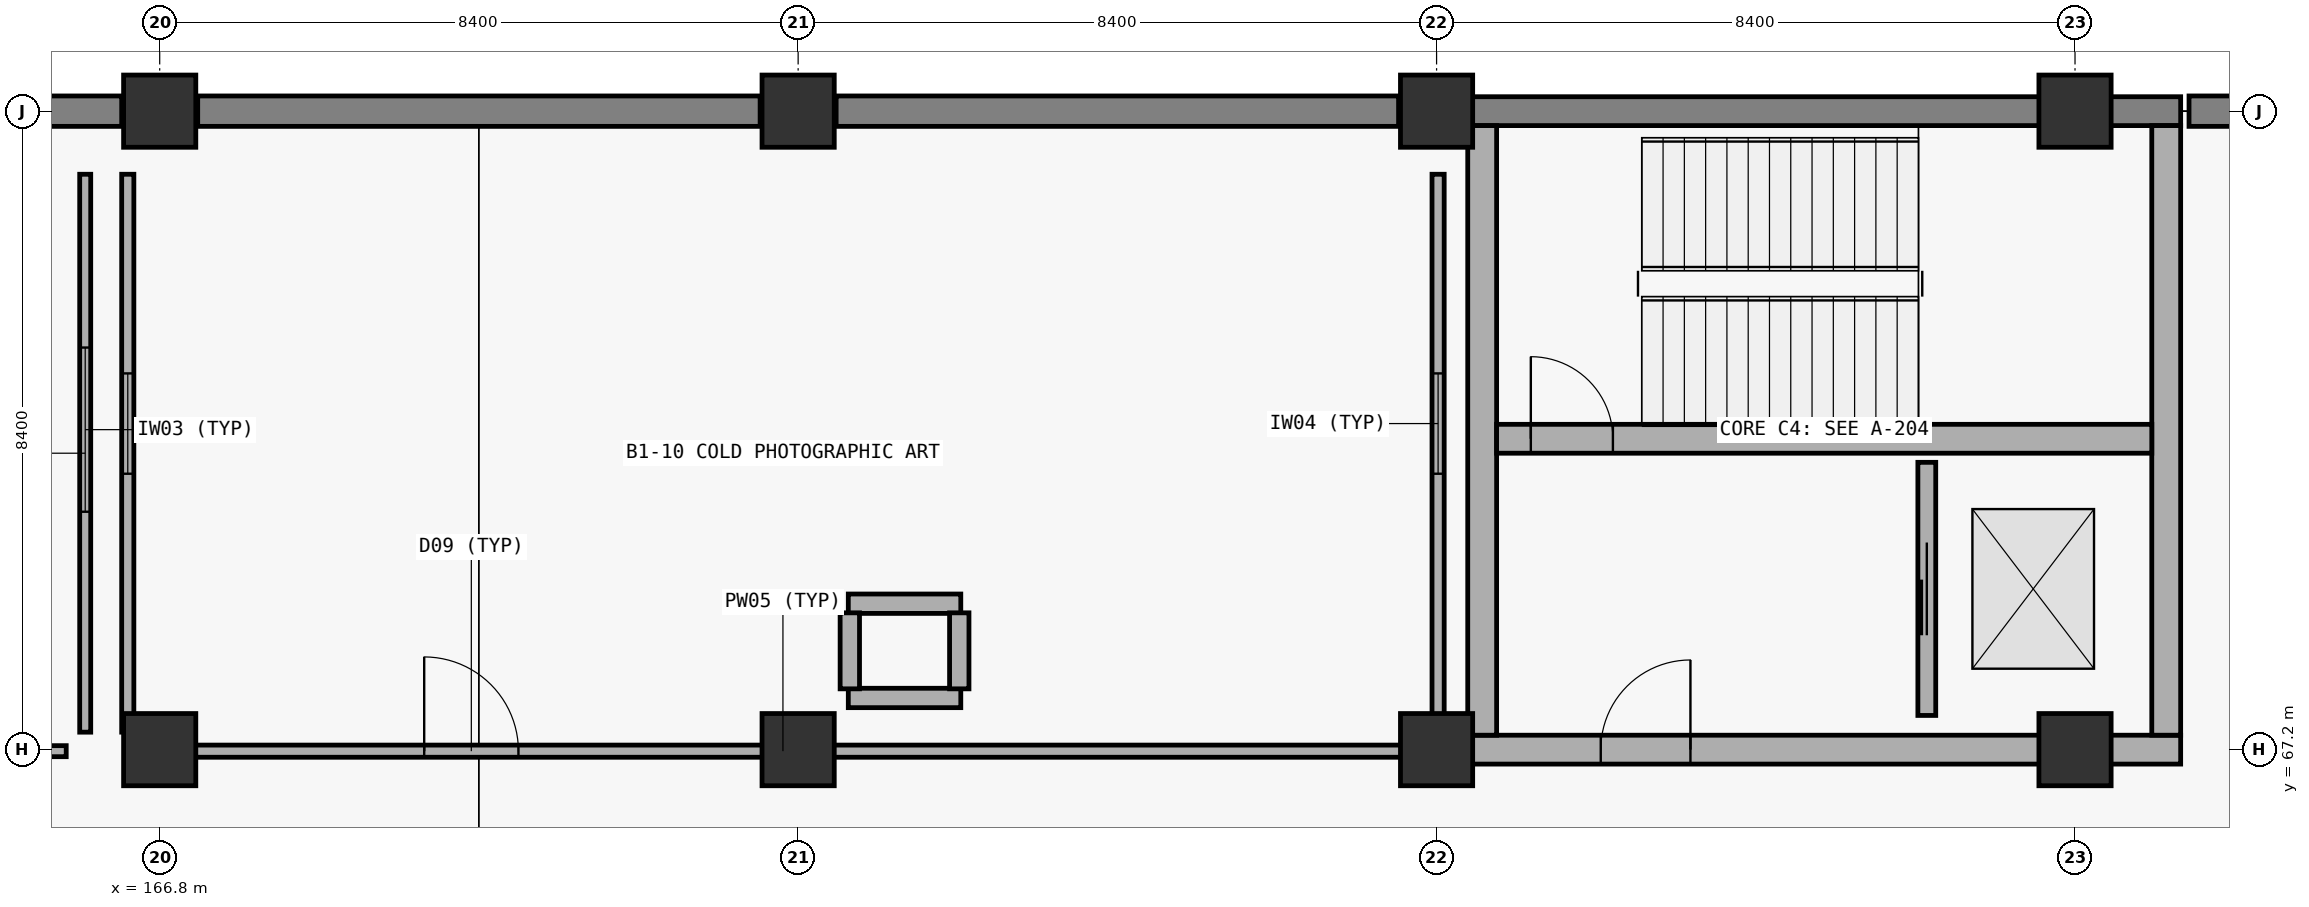
"""IFC4 building model, lengths in metres.
Left out: names, types, materials, properties, quantities, classifications, styles, units other than length and angle.
Written with IfcOpenShell. Run it as: python <this file> out.ifc"""

import sys

from ifc_helpers import new_model, si_unit, direction, frame, frame_2d, origin, origin_2d, place, context, subcontext, project, spatial, rectangle, extrude, element, fill, save


model = new_model("IFC4")
c1 = context("Model", 3, precision=1e-05, world=origin(), true_north=direction((0.0, 1.0)))
c2 = subcontext(c1, "Body", "Model", "MODEL_VIEW")
j1 = project(units=[si_unit("LENGTHUNIT", "METRE"), si_unit("PLANEANGLEUNIT", "RADIAN")], contexts=[c1])
p1 = place(None, origin())
s1 = spatial("IfcSite", under=j1, at=p1, CompositionType="ELEMENT")
p2 = place(p1, origin())
s2 = spatial("IfcBuilding", under=s1, at=p2, CompositionType="ELEMENT")
p3 = place(p2, frame((0.0, 0.0, -4.8)))
s3 = spatial("IfcBuildingStorey", under=s2, at=p3, CompositionType="ELEMENT", Elevation=-4.8)
for number, where, z_axis, x_axis in (
    (1, (166.8, 67.2, 0.0), (0.0, 0.0, 1.0), (1.0, 0.0, 0.0)),
    (2, (166.8, 75.6, 0.0), (0.0, 0.0, 1.0), (1.0, 0.0, 0.0)),
    (3, (175.2, 67.2, 0.0), (0.0, 0.0, 1.0), (1.0, 0.0, 0.0)),
    (4, (175.2, 75.6, 0.0), (0.0, 0.0, 1.0), (1.0, 0.0, 0.0)),
    (5, (183.6, 67.2, 0.0), (0.0, 0.0, 1.0), (1.0, 0.0, 0.0)),
    (6, (183.6, 75.6, 0.0), (0.0, 0.0, 1.0), (1.0, 0.0, 0.0)),
    (7, (192.0, 67.2, 0.0), (0.0, 0.0, 1.0), (1.0, 0.0, 0.0)),
    (8, (192.0, 75.6, 0.0), (0.0, 0.0, 1.0), (1.0, 0.0, 0.0)),
):
    element("IfcColumn", number, at=place(p3, frame(where, z_axis=z_axis, x_axis=x_axis)), inside=s3, PredefinedType="COLUMN", context=c2, shape_type="SweptSolid", body=[
        extrude(rectangle(XDim=0.95, YDim=0.95, at=origin_2d()), origin(), (0.0, 0.0, 1.0), 4.8),
    ])
p4 = place(p3, frame((184.01, 67.2, 0.0), z_axis=(0.0, 0.0, 1.0), x_axis=(1.0, 0.0, 0.0)))
e9 = element("IfcWall", 9, at=p4, inside=s3, PredefinedType="SHEAR", context=c2, shape_type="SweptSolid", body=[
    extrude(rectangle(XDim=9.38, YDim=0.38, at=frame_2d((4.69, 0.0))), origin(), (0.0, 0.0, 1.0), 4.8),
])
p5 = place(p4, frame((1.75, 0.0, 0.0)))
e10 = element("IfcOpeningElement", 10, at=p5, cuts=e9, PredefinedType="OPENING", context=c2, shape_type="SweptSolid", body=[
    extrude(rectangle(XDim=1.18, YDim=2.24, at=frame_2d((0.59, 1.12))), frame((0.0, 0.2, 0.0), z_axis=(0.0, -1.0, 0.0), x_axis=(1.0, 0.0, 0.0)), (0.0, 0.0, 1.0), 0.4),
])
p6 = place(p3, frame((184.01, 75.6, 0.0), z_axis=(0.0, 0.0, 1.0), x_axis=(1.0, 0.0, 0.0)))
e11 = element("IfcWall", 11, at=p6, inside=s3, PredefinedType="SHEAR", context=c2, shape_type="SweptSolid", body=[
    extrude(rectangle(XDim=9.38, YDim=0.38, at=frame_2d((4.69, 0.0))), origin(), (0.0, 0.0, 1.0), 4.8),
])
for number, where, z_axis, x_axis in (
    (12, (184.2, 67.39, 0.0), (0.0, 0.0, 1.0), (0.0, 1.0, 0.0)),
    (13, (193.2, 67.39, 0.0), (0.0, 0.0, 1.0), (0.0, 1.0, 0.0)),
):
    element("IfcWall", number, at=place(p3, frame(where, z_axis=z_axis, x_axis=x_axis)), inside=s3, PredefinedType="SHEAR", context=c2, shape_type="SweptSolid", body=[
        extrude(rectangle(XDim=8.02, YDim=0.38, at=frame_2d((4.01, 0.0))), origin(), (0.0, 0.0, 1.0), 4.8),
    ])
p7 = place(p3, frame((184.39, 71.29, 0.0), z_axis=(0.0, 0.0, 1.0), x_axis=(1.0, 0.0, 0.0)))
e14 = element("IfcWall", 14, at=p7, inside=s3, PredefinedType="SHEAR", context=c2, shape_type="SweptSolid", body=[
    extrude(rectangle(XDim=8.62, YDim=0.38, at=frame_2d((4.31, 0.0))), origin(), (0.0, 0.0, 1.0), 4.8),
])
p8 = place(p7, frame((0.45, 0.0, 0.0)))
e15 = element("IfcOpeningElement", 15, at=p8, cuts=e14, PredefinedType="OPENING", context=c2, shape_type="SweptSolid", body=[
    extrude(rectangle(XDim=1.08, YDim=2.18, at=frame_2d((0.54, 1.09))), frame((0.0, 0.2, 0.0), z_axis=(0.0, -1.0, 0.0), x_axis=(1.0, 0.0, 0.0)), (0.0, 0.0, 1.0), 0.4),
])
p9 = place(p3, frame((158.9, 75.6, 0.0), z_axis=(0.0, 0.0, 1.0), x_axis=(1.0, 0.0, 0.0)))
e16 = element("IfcWall", 16, at=p9, inside=s3, PredefinedType="USERDEFINED", context=c2, shape_type="SweptSolid", body=[
    extrude(rectangle(XDim=7.4, YDim=0.4, at=frame_2d((3.7, 0.0))), origin(), (0.0, 0.0, 1.0), 4.8),
])
p10 = place(p3, frame((167.3, 75.6, 0.0), z_axis=(0.0, 0.0, 1.0), x_axis=(1.0, 0.0, 0.0)))
e17 = element("IfcWall", 17, at=p10, inside=s3, PredefinedType="USERDEFINED", context=c2, shape_type="SweptSolid", body=[
    extrude(rectangle(XDim=7.4, YDim=0.4, at=frame_2d((3.7, 0.0))), origin(), (0.0, 0.0, 1.0), 4.8),
])
p11 = place(p3, frame((175.7, 75.6, 0.0), z_axis=(0.0, 0.0, 1.0), x_axis=(1.0, 0.0, 0.0)))
e18 = element("IfcWall", 18, at=p11, inside=s3, PredefinedType="USERDEFINED", context=c2, shape_type="SweptSolid", body=[
    extrude(rectangle(XDim=7.4, YDim=0.4, at=frame_2d((3.7, 0.0))), origin(), (0.0, 0.0, 1.0), 4.8),
])
p12 = place(p3, frame((193.5, 75.6, 0.0), z_axis=(0.0, 0.0, 1.0), x_axis=(1.0, 0.0, 0.0)))
e19 = element("IfcWall", 19, at=p12, inside=s3, PredefinedType="USERDEFINED", context=c2, shape_type="SweptSolid", body=[
    extrude(rectangle(XDim=6.4, YDim=0.4, at=frame_2d((3.2, 0.0))), origin(), (0.0, 0.0, 1.0), 4.8),
])
p13 = place(p3, frame((190.05, 67.65, 0.0), z_axis=(0.0, 0.0, 1.0), x_axis=(0.0, 1.0, 0.0)))
e20 = element("IfcWall", 20, at=p13, inside=s3, PredefinedType="PARTITIONING", context=c2, shape_type="SweptSolid", body=[
    extrude(rectangle(XDim=3.33, YDim=0.235, at=frame_2d((1.665, 0.0))), origin(), (0.0, 0.0, 1.0), 3.46),
])
p14 = place(p13, frame((1.055, 0.0, 0.0)))
e21 = element("IfcOpeningElement", 21, at=p14, cuts=e20, PredefinedType="OPENING", context=c2, shape_type="SweptSolid", body=[
    extrude(rectangle(XDim=1.22, YDim=2.24, at=frame_2d((0.61, 1.12))), frame((0.0, 0.127, 0.0), z_axis=(0.0, -1.0, 0.0), x_axis=(1.0, 0.0, 0.0)), (0.0, 0.0, 1.0), 0.255),
])
for number, where, z_axis, x_axis in (
    (22, (175.86, 69.12, 0.0), (0.0, 0.0, 1.0), (1.0, 0.0, 0.0)),
    (23, (175.86, 67.88, 0.0), (0.0, 0.0, 1.0), (1.0, 0.0, 0.0)),
):
    element("IfcWall", number, at=place(p3, frame(where, z_axis=z_axis, x_axis=x_axis)), inside=s3, PredefinedType="PARTITIONING", context=c2, shape_type="SweptSolid", body=[
        extrude(rectangle(XDim=1.48, YDim=0.255, at=frame_2d((0.74, 0.0))), origin(), (0.0, 0.0, 1.0), 4.36),
    ])
for number, where, z_axis, x_axis in (
    (24, (175.88, 68.0, 0.0), (0.0, 0.0, 1.0), (0.0, 1.0, 0.0)),
    (25, (177.32, 68.0, 0.0), (0.0, 0.0, 1.0), (0.0, 1.0, 0.0)),
):
    element("IfcWall", number, at=place(p3, frame(where, z_axis=z_axis, x_axis=x_axis)), inside=s3, PredefinedType="PARTITIONING", context=c2, shape_type="SweptSolid", body=[
        extrude(rectangle(XDim=1.0, YDim=0.255, at=frame_2d((0.5, 0.0))), origin(), (0.0, 0.0, 1.0), 4.36),
    ])
p15 = place(p3, frame((142.43, 67.18, 0.0), z_axis=(0.0, 0.0, 1.0), x_axis=(1.0, 0.0, 0.0)))
e26 = element("IfcWall", 26, at=p15, inside=s3, PredefinedType="PARTITIONING", context=c2, shape_type="SweptSolid", body=[
    extrude(rectangle(XDim=23.14, YDim=0.145, at=frame_2d((11.57, 0.0))), origin(), (0.0, 0.0, 1.0), 3.41),
])
p16 = place(p15, frame((18.9, 0.0, 0.0)))
e27 = element("IfcOpeningElement", 27, at=p16, cuts=e26, PredefinedType="OPENING", context=c2, shape_type="SweptSolid", body=[
    extrude(rectangle(XDim=2.58, YDim=2.82, at=frame_2d((1.29, 1.41))), frame((0.0, 0.083, 0.0), z_axis=(0.0, -1.0, 0.0), x_axis=(1.0, 0.0, 0.0)), (0.0, 0.0, 1.0), 0.165),
])
p17 = place(p3, frame((165.82, 67.43, 0.0), z_axis=(0.0, 0.0, 1.0), x_axis=(0.0, 1.0, 0.0)))
e28 = element("IfcWall", 28, at=p17, inside=s3, PredefinedType="PARTITIONING", context=c2, shape_type="SweptSolid", body=[
    extrude(rectangle(XDim=7.34, YDim=0.145, at=frame_2d((3.67, 0.0))), origin(), (0.0, 0.0, 1.0), 3.41),
])
p18 = place(p17, frame((2.9, 0.0, 0.9)))
e29 = element("IfcOpeningElement", 29, at=p18, cuts=e28, PredefinedType="OPENING", context=c2, shape_type="SweptSolid", body=[
    extrude(rectangle(XDim=2.16, YDim=1.42, at=frame_2d((1.08, 0.71))), frame((0.0, 0.083, 0.0), z_axis=(0.0, -1.0, 0.0), x_axis=(1.0, 0.0, 0.0)), (0.0, 0.0, 1.0), 0.165),
])
p19 = place(p3, frame((166.63, 67.18, 0.0), z_axis=(0.0, 0.0, 1.0), x_axis=(1.0, 0.0, 0.0)))
e30 = element("IfcWall", 30, at=p19, inside=s3, PredefinedType="PARTITIONING", context=c2, shape_type="SweptSolid", body=[
    extrude(rectangle(XDim=16.74, YDim=0.16, at=frame_2d((8.37, 0.0))), origin(), (0.0, 0.0, 1.0), 2.96),
])
p20 = place(p19, frame((3.65, 0.0, 0.0)))
e31 = element("IfcOpeningElement", 31, at=p20, cuts=e30, PredefinedType="OPENING", context=c2, shape_type="SweptSolid", body=[
    extrude(rectangle(XDim=1.24, YDim=2.28, at=frame_2d((0.62, 1.14))), frame((0.0, 0.09, 0.0), z_axis=(0.0, -1.0, 0.0), x_axis=(1.0, 0.0, 0.0)), (0.0, 0.0, 1.0), 0.18),
])
p21 = place(p3, frame((166.38, 67.43, 0.0), z_axis=(0.0, 0.0, 1.0), x_axis=(0.0, 1.0, 0.0)))
e32 = element("IfcWall", 32, at=p21, inside=s3, PredefinedType="PARTITIONING", context=c2, shape_type="SweptSolid", body=[
    extrude(rectangle(XDim=7.34, YDim=0.16, at=frame_2d((3.67, 0.0))), origin(), (0.0, 0.0, 1.0), 3.41),
])
p22 = place(p21, frame((3.4, 0.0, 0.9)))
e33 = element("IfcOpeningElement", 33, at=p22, cuts=e32, PredefinedType="OPENING", context=c2, shape_type="SweptSolid", body=[
    extrude(rectangle(XDim=1.32, YDim=1.5, at=frame_2d((0.66, 0.75))), frame((0.0, 0.09, 0.0), z_axis=(0.0, -1.0, 0.0), x_axis=(1.0, 0.0, 0.0)), (0.0, 0.0, 1.0), 0.18),
])
p23 = place(p3, frame((183.62, 67.43, 0.0), z_axis=(0.0, 0.0, 1.0), x_axis=(0.0, 1.0, 0.0)))
e34 = element("IfcWall", 34, at=p23, inside=s3, PredefinedType="PARTITIONING", context=c2, shape_type="SweptSolid", body=[
    extrude(rectangle(XDim=7.34, YDim=0.16, at=frame_2d((3.67, 0.0))), origin(), (0.0, 0.0, 1.0), 3.46),
])
p24 = place(p23, frame((3.4, 0.0, 0.9)))
e35 = element("IfcOpeningElement", 35, at=p24, cuts=e34, PredefinedType="OPENING", context=c2, shape_type="SweptSolid", body=[
    extrude(rectangle(XDim=1.32, YDim=1.5, at=frame_2d((0.66, 0.75))), frame((0.0, 0.09, 0.0), z_axis=(0.0, -1.0, 0.0), x_axis=(1.0, 0.0, 0.0)), (0.0, 0.0, 1.0), 0.18),
])
p25 = place(p8, origin())
e36 = element("IfcDoor", 36, at=p25, inside=s3, OperationType="SINGLE_SWING_LEFT", PredefinedType="DOOR", context=c2, shape_type="SweptSolid", body=[
    extrude(rectangle(XDim=1.08, YDim=2.18, at=frame_2d((0.54, 1.09))), frame((0.0, 0.025, 0.0), z_axis=(0.0, -1.0, 0.0), x_axis=(1.0, 0.0, 0.0)), (0.0, 0.0, 1.0), 0.05),
])
fill(e15, e36)
p26 = place(p5, origin())
e37 = element("IfcDoor", 37, at=p26, inside=s3, OperationType="SINGLE_SWING_RIGHT", PredefinedType="DOOR", context=c2, shape_type="SweptSolid", body=[
    extrude(rectangle(XDim=1.18, YDim=2.24, at=frame_2d((0.59, 1.12))), frame((0.0, 0.025, 0.0), z_axis=(0.0, -1.0, 0.0), x_axis=(1.0, 0.0, 0.0)), (0.0, 0.0, 1.0), 0.05),
])
fill(e10, e37)
p27 = place(p14, origin())
e38 = element("IfcDoor", 38, at=p27, inside=s3, OperationType="SLIDING_TO_RIGHT", PredefinedType="DOOR", context=c2, shape_type="SweptSolid", body=[
    extrude(rectangle(XDim=1.22, YDim=2.24, at=frame_2d((0.61, 1.12))), frame((0.0, 0.025, 0.0), z_axis=(0.0, -1.0, 0.0), x_axis=(1.0, 0.0, 0.0)), (0.0, 0.0, 1.0), 0.05),
])
fill(e21, e38)
p28 = place(p18, origin())
e39 = element("IfcWindow", 39, at=p28, inside=s3, PartitioningType="SINGLE_PANEL", PredefinedType="WINDOW", context=c2, shape_type="SweptSolid", body=[
    extrude(rectangle(XDim=2.16, YDim=1.42, at=frame_2d((1.08, 0.71))), frame((0.0, 0.03, 0.0), z_axis=(0.0, -1.0, 0.0), x_axis=(1.0, 0.0, 0.0)), (0.0, 0.0, 1.0), 0.06),
])
fill(e29, e39)
p29 = place(p20, origin())
e40 = element("IfcDoor", 40, at=p29, inside=s3, OperationType="SINGLE_SWING_LEFT", PredefinedType="DOOR", context=c2, shape_type="SweptSolid", body=[
    extrude(rectangle(XDim=1.24, YDim=2.28, at=frame_2d((0.62, 1.14))), frame((0.0, 0.025, 0.0), z_axis=(0.0, -1.0, 0.0), x_axis=(1.0, 0.0, 0.0)), (0.0, 0.0, 1.0), 0.05),
])
fill(e31, e40)
p30 = place(p22, origin())
e41 = element("IfcWindow", 41, at=p30, inside=s3, PartitioningType="SINGLE_PANEL", PredefinedType="WINDOW", context=c2, shape_type="SweptSolid", body=[
    extrude(rectangle(XDim=1.32, YDim=1.5, at=frame_2d((0.66, 0.75))), frame((0.0, 0.03, 0.0), z_axis=(0.0, -1.0, 0.0), x_axis=(1.0, 0.0, 0.0)), (0.0, 0.0, 1.0), 0.06),
])
fill(e33, e41)
p31 = place(p24, origin())
e42 = element("IfcWindow", 42, at=p31, inside=s3, PartitioningType="SINGLE_PANEL", PredefinedType="WINDOW", context=c2, shape_type="SweptSolid", body=[
    extrude(rectangle(XDim=1.32, YDim=1.5, at=frame_2d((0.66, 0.75))), frame((0.0, 0.03, 0.0), z_axis=(0.0, -1.0, 0.0), x_axis=(1.0, 0.0, 0.0)), (0.0, 0.0, 1.0), 0.06),
])
fill(e35, e42)
save(model, sys.argv[1])
